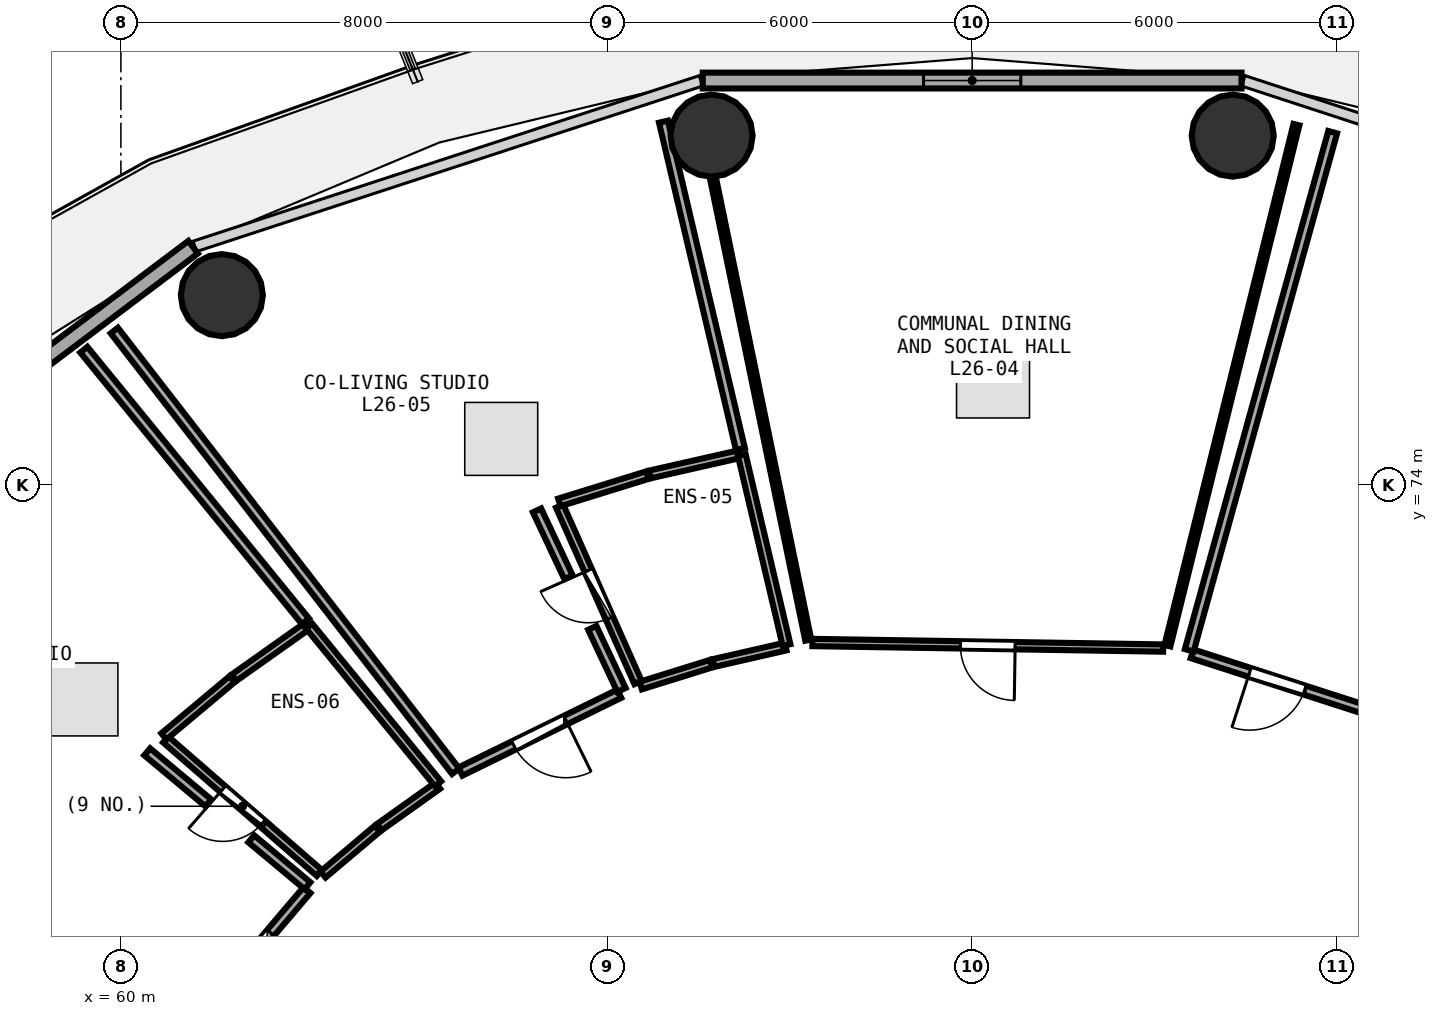
"""IFC4 building model, lengths in metres.
Left out: names, types, materials, properties, quantities, classifications, styles, units other than length and angle.
Written with IfcOpenShell. Run it as: python <this file> out.ifc"""

import sys

from ifc_helpers import new_model, si_unit, direction, frame, frame_2d, origin, origin_2d, place, context, subcontext, project, spatial, rectangle, circle, extrude, element, fill, save


model = new_model("IFC4")
c1 = context("Model", 3, precision=1e-05, world=origin(), true_north=direction((0.0, 1.0)))
c2 = subcontext(c1, "Body", "Model", "MODEL_VIEW")
j1 = project(units=[si_unit("LENGTHUNIT", "METRE"), si_unit("PLANEANGLEUNIT", "RADIAN")], contexts=[c1])
p1 = place(None, origin())
s1 = spatial("IfcSite", under=j1, at=p1, CompositionType="ELEMENT")
p2 = place(p1, origin())
s2 = spatial("IfcBuilding", under=s1, at=p2, CompositionType="ELEMENT")
p3 = place(p2, frame((0.0, 0.0, 102.6)))
s3 = spatial("IfcBuildingStorey", under=s2, at=p3, CompositionType="ELEMENT", Elevation=102.6)
for number, where, z_axis, x_axis in (
    (1, (78.286, 79.745, 0.0), (0.0, 0.0, 1.0), (1.0, 0.0, 0.0)),
    (2, (69.714, 79.745, 0.0), (0.0, 0.0, 1.0), (1.0, 0.0, 0.0)),
    (3, (61.66, 77.122, 0.0), (0.0, 0.0, 1.0), (1.0, 0.0, 0.0)),
):
    element("IfcColumn", number, at=place(p3, frame(where, z_axis=z_axis, x_axis=x_axis)), inside=s3, PredefinedType="COLUMN", context=c2, shape_type="SweptSolid", body=[
        extrude(circle(Radius=0.675, at=origin_2d()), origin(), (0.0, 0.0, 1.0), 3.75),
    ])
p4 = place(p3, frame((78.43, 80.651, 0.0), z_axis=(0.0, 0.0, 1.0), x_axis=(-1.0, 0.0, 0.0)))
e4 = element("IfcWall", 4, at=p4, inside=s3, PredefinedType="SOLIDWALL", context=c2, shape_type="SweptSolid", body=[
    extrude(rectangle(XDim=8.861, YDim=0.26, at=frame_2d((4.43, 0.0))), origin(), (0.0, 0.0, 1.0), 3.475),
])
p5 = place(p4, frame((3.63, 0.0, 0.85)))
e5 = element("IfcOpeningElement", 5, at=p5, cuts=e4, PredefinedType="OPENING", context=c2, shape_type="SweptSolid", body=[
    extrude(rectangle(XDim=1.6, YDim=1.45, at=frame_2d((0.8, 0.725))), frame((0.0, 0.14, 0.0), z_axis=(0.0, -1.0, 0.0), x_axis=(1.0, 0.0, 0.0)), (0.0, 0.0, 1.0), 0.28),
])
p6 = place(p3, frame((61.188, 77.91, 0.0), z_axis=(0.0, 0.0, 1.0), x_axis=(-0.798501507879, -0.601992808857, 0.0)))
e6 = element("IfcWall", 6, at=p6, inside=s3, PredefinedType="SOLIDWALL", context=c2, shape_type="SweptSolid", body=[
    extrude(rectangle(XDim=8.499, YDim=0.26, at=frame_2d((4.25, 0.0))), origin(), (0.0, 0.0, 1.0), 3.475),
])
p7 = place(p6, frame((3.45, 0.0, 0.85)))
e7 = element("IfcOpeningElement", 7, at=p7, cuts=e6, PredefinedType="OPENING", context=c2, shape_type="SweptSolid", body=[
    extrude(rectangle(XDim=1.6, YDim=1.45, at=frame_2d((0.8, 0.725))), frame((0.0, 0.14, 0.0), z_axis=(0.0, -1.0, 0.0), x_axis=(1.0, 0.0, 0.0)), (0.0, 0.0, 1.0), 0.28),
])
p8 = place(p3, frame((80.415, 70.32, 0.0), z_axis=(0.0, 0.0, 1.0), x_axis=(-0.951622481895, 0.307269673009, 0.0)))
e8 = element("IfcWall", 8, at=p8, inside=s3, PredefinedType="PARTITIONING", context=c2, shape_type="SweptSolid", body=[
    extrude(rectangle(XDim=2.94, YDim=0.15, at=frame_2d((1.47, 0.0))), origin(), (0.0, 0.0, 1.0), 3.235),
])
p9 = place(p8, frame((0.995, 0.0, 0.0)))
e9 = element("IfcOpeningElement", 9, at=p9, cuts=e8, PredefinedType="OPENING", context=c2, shape_type="SweptSolid", body=[
    extrude(rectangle(XDim=0.95, YDim=2.08, at=frame_2d((0.475, 1.04))), frame((0.0, 0.085, 0.0), z_axis=(0.0, -1.0, 0.0), x_axis=(1.0, 0.0, 0.0)), (0.0, 0.0, 1.0), 0.17),
])
p10 = place(p3, frame((77.142, 71.318, 0.0), z_axis=(0.0, 0.0, 1.0), x_axis=(-0.999874771211, 0.015825356091, 0.0)))
e10 = element("IfcWall", 10, at=p10, inside=s3, PredefinedType="PARTITIONING", context=c2, shape_type="SweptSolid", body=[
    extrude(rectangle(XDim=5.77, YDim=0.12, at=frame_2d((2.885, 0.0))), origin(), (0.0, 0.0, 1.0), 3.48),
])
p11 = place(p10, frame((2.435, 0.0, 0.0)))
e11 = element("IfcOpeningElement", 11, at=p11, cuts=e10, PredefinedType="OPENING", context=c2, shape_type="SweptSolid", body=[
    extrude(rectangle(XDim=0.9, YDim=2.08, at=frame_2d((0.45, 1.04))), frame((0.0, 0.07, 0.0), z_axis=(0.0, -1.0, 0.0), x_axis=(1.0, 0.0, 0.0)), (0.0, 0.0, 1.0), 0.14),
])
p12 = place(p3, frame((68.506, 70.75, 0.0), z_axis=(0.0, 0.0, 1.0), x_axis=(-0.406231177337, 0.913770337973, 0.0)))
e12 = element("IfcWall", 12, at=p12, inside=s3, PredefinedType="PLUMBINGWALL", context=c2, shape_type="SweptSolid", body=[
    extrude(rectangle(XDim=3.176, YDim=0.13, at=frame_2d((1.588, 0.0))), origin(), (0.0, 0.0, 1.0), 3.175),
])
p13 = place(p12, frame((1.158, 0.0, 0.0)))
e13 = element("IfcOpeningElement", 13, at=p13, cuts=e12, PredefinedType="OPENING", context=c2, shape_type="SweptSolid", body=[
    extrude(rectangle(XDim=0.86, YDim=2.05, at=frame_2d((0.43, 1.025))), frame((0.0, 0.075, 0.0), z_axis=(0.0, -1.0, 0.0), x_axis=(1.0, 0.0, 0.0)), (0.0, 0.0, 1.0), 0.15),
])
p14 = place(p3, frame((68.196, 70.567, 0.0), z_axis=(0.0, 0.0, 1.0), x_axis=(-0.89794088417, -0.440116085296, 0.0)))
e14 = element("IfcWall", 14, at=p14, inside=s3, PredefinedType="PARTITIONING", context=c2, shape_type="SweptSolid", body=[
    extrude(rectangle(XDim=2.909, YDim=0.15, at=frame_2d((1.455, 0.0))), origin(), (0.0, 0.0, 1.0), 3.235),
])
p15 = place(p14, frame((0.98, 0.0, 0.0)))
e15 = element("IfcOpeningElement", 15, at=p15, cuts=e14, PredefinedType="OPENING", context=c2, shape_type="SweptSolid", body=[
    extrude(rectangle(XDim=0.95, YDim=2.08, at=frame_2d((0.475, 1.04))), frame((0.0, 0.085, 0.0), z_axis=(0.0, -1.0, 0.0), x_axis=(1.0, 0.0, 0.0)), (0.0, 0.0, 1.0), 0.17),
])
p16 = place(p3, frame((63.264, 67.619, 0.0), z_axis=(0.0, 0.0, 1.0), x_axis=(-0.75497608509, 0.65575232439, 0.0)))
e16 = element("IfcWall", 16, at=p16, inside=s3, PredefinedType="PLUMBINGWALL", context=c2, shape_type="SweptSolid", body=[
    extrude(rectangle(XDim=3.346, YDim=0.13, at=frame_2d((1.673, 0.0))), origin(), (0.0, 0.0, 1.0), 3.235),
])
p17 = place(p16, frame((1.243, 0.0, 0.0)))
e17 = element("IfcOpeningElement", 17, at=p17, cuts=e16, PredefinedType="OPENING", context=c2, shape_type="SweptSolid", body=[
    extrude(rectangle(XDim=0.86, YDim=2.05, at=frame_2d((0.43, 1.025))), frame((0.0, 0.075, 0.0), z_axis=(0.0, -1.0, 0.0), x_axis=(1.0, 0.0, 0.0)), (0.0, 0.0, 1.0), 0.15),
])
p18 = place(p3, frame((63.06, 67.337, 0.0), z_axis=(0.0, 0.0, 1.0), x_axis=(-0.647519081114, -0.762049236988, 0.0)))
e18 = element("IfcWall", 18, at=p18, inside=s3, PredefinedType="PARTITIONING", context=c2, shape_type="SweptSolid", body=[
    extrude(rectangle(XDim=2.795, YDim=0.15, at=frame_2d((1.397, 0.0))), origin(), (0.0, 0.0, 1.0), 2.925),
])
p19 = place(p18, frame((0.922, 0.0, 0.0)))
e19 = element("IfcOpeningElement", 19, at=p19, cuts=e18, PredefinedType="OPENING", context=c2, shape_type="SweptSolid", body=[
    extrude(rectangle(XDim=0.95, YDim=2.08, at=frame_2d((0.475, 1.04))), frame((0.0, 0.085, 0.0), z_axis=(0.0, -1.0, 0.0), x_axis=(1.0, 0.0, 0.0)), (0.0, 0.0, 1.0), 0.17),
])
p20 = place(p3, frame((77.571, 71.281, 0.0), z_axis=(0.0, 0.0, 1.0), x_axis=(0.266746506471, 0.963766725554, 0.0)))
e20 = element("IfcWall", 20, at=p20, inside=s3, PredefinedType="PARTITIONING", context=c2, shape_type="SweptSolid", body=[
    extrude(rectangle(XDim=8.841, YDim=0.15, at=frame_2d((4.421, 0.0))), origin(), (0.0, 0.0, 1.0), 2.925),
])
p21 = place(p3, frame((71.305, 71.449, 0.0), z_axis=(0.0, 0.0, 1.0), x_axis=(-0.202123638545, 0.979360012836, 0.0)))
e21 = element("IfcWall", 21, at=p21, inside=s3, PredefinedType="PARTITIONING", context=c2, shape_type="SweptSolid", body=[
    extrude(rectangle(XDim=7.756, YDim=0.1, at=frame_2d((3.878, 0.0))), origin(), (0.0, 0.0, 1.0), 2.925),
])
p22 = place(p3, frame((79.333, 79.925, 0.0), z_axis=(0.0, 0.0, 1.0), x_axis=(-0.240342194274, -0.970688224741, 0.0)))
e22 = element("IfcWall", 22, at=p22, inside=s3, PredefinedType="PARTITIONING", context=c2, shape_type="SweptSolid", body=[
    extrude(rectangle(XDim=8.828, YDim=0.1, at=frame_2d((4.414, 0.0))), origin(), (0.0, 0.0, 1.0), 2.925),
])
p23 = place(p3, frame((70.933, 71.343, 0.0), z_axis=(0.0, 0.0, 1.0), x_axis=(-0.974915720647, -0.222574341818, 0.0)))
e23 = element("IfcWall", 23, at=p23, inside=s3, PredefinedType="PLUMBINGWALL", context=c2, shape_type="SweptSolid", body=[
    extrude(rectangle(XDim=1.218, YDim=0.13, at=frame_2d((0.609, 0.0))), origin(), (0.0, 0.0, 1.0), 2.925),
])
p24 = place(p3, frame((69.707, 71.061, 0.0), z_axis=(0.0, 0.0, 1.0), x_axis=(-0.954873275734, -0.297013513646, 0.0)))
e24 = element("IfcWall", 24, at=p24, inside=s3, PredefinedType="PLUMBINGWALL", context=c2, shape_type="SweptSolid", body=[
    extrude(rectangle(XDim=1.212, YDim=0.13, at=frame_2d((0.606, 0.0))), origin(), (0.0, 0.0, 1.0), 3.48),
])
p25 = place(p3, frame((67.21, 73.713, 0.0), z_axis=(0.0, 0.0, 1.0), x_axis=(0.955249123401, 0.295802488566, 0.0)))
e25 = element("IfcWall", 25, at=p25, inside=s3, PredefinedType="PLUMBINGWALL", context=c2, shape_type="SweptSolid", body=[
    extrude(rectangle(XDim=1.519, YDim=0.13, at=frame_2d((0.759, 0.0))), origin(), (0.0, 0.0, 1.0), 3.48),
])
p26 = place(p3, frame((68.699, 74.172, 0.0), z_axis=(0.0, 0.0, 1.0), x_axis=(0.975247540647, 0.221115884688, 0.0)))
e26 = element("IfcWall", 26, at=p26, inside=s3, PredefinedType="PLUMBINGWALL", context=c2, shape_type="SweptSolid", body=[
    extrude(rectangle(XDim=1.525, YDim=0.13, at=frame_2d((0.762, 0.0))), origin(), (0.0, 0.0, 1.0), 2.925),
])
p27 = place(p3, frame((70.211, 74.494, 0.0), z_axis=(0.0, 0.0, 1.0), x_axis=(0.229284929256, -0.973359348451, 0.0)))
e27 = element("IfcWall", 27, at=p27, inside=s3, PredefinedType="PLUMBINGWALL", context=c2, shape_type="SweptSolid", body=[
    extrude(rectangle(XDim=3.214, YDim=0.13, at=frame_2d((1.607, 0.0))), origin(), (0.0, 0.0, 1.0), 2.925),
])
p28 = place(p3, frame((65.506, 69.292, 0.0), z_axis=(0.0, 0.0, 1.0), x_axis=(-0.612364923916, 0.790575233585, 0.0)))
e28 = element("IfcWall", 28, at=p28, inside=s3, PredefinedType="PARTITIONING", context=c2, shape_type="SweptSolid", body=[
    extrude(rectangle(XDim=9.168, YDim=0.15, at=frame_2d((4.584, 0.0))), origin(), (0.0, 0.0, 1.0), 2.925),
])
p29 = place(p3, frame((68.923, 79.974, 0.0), z_axis=(0.0, 0.0, 1.0), x_axis=(0.228901508724, -0.973449587449, 0.0)))
e29 = element("IfcWall", 29, at=p29, inside=s3, PredefinedType="PARTITIONING", context=c2, shape_type="SweptSolid", body=[
    extrude(rectangle(XDim=5.529, YDim=0.15, at=frame_2d((2.765, 0.0))), origin(), (0.0, 0.0, 1.0), 2.925),
])
p30 = place(p3, frame((66.844, 73.582, 0.0), z_axis=(0.0, 0.0, 1.0), x_axis=(0.42562282943, -0.904900661436, 0.0)))
e30 = element("IfcWall", 30, at=p30, inside=s3, PredefinedType="PARTITIONING", context=c2, shape_type="SweptSolid", body=[
    extrude(rectangle(XDim=1.215, YDim=0.15, at=frame_2d((0.607, 0.0))), origin(), (0.0, 0.0, 1.0), 3.175),
])
p31 = place(p3, frame((67.753, 71.65, 0.0), z_axis=(0.0, 0.0, 1.0), x_axis=(0.425609366017, -0.904906993872, 0.0)))
e31 = element("IfcWall", 31, at=p31, inside=s3, PredefinedType="PARTITIONING", context=c2, shape_type="SweptSolid", body=[
    extrude(rectangle(XDim=1.128, YDim=0.15, at=frame_2d((0.564, 0.0))), origin(), (0.0, 0.0, 1.0), 3.48),
])
p32 = place(p3, frame((65.213, 69.057, 0.0), z_axis=(0.0, 0.0, 1.0), x_axis=(-0.814779575245, -0.579770854531, 0.0)))
e32 = element("IfcWall", 32, at=p32, inside=s3, PredefinedType="PLUMBINGWALL", context=c2, shape_type="SweptSolid", body=[
    extrude(rectangle(XDim=1.181, YDim=0.13, at=frame_2d((0.591, 0.0))), origin(), (0.0, 0.0, 1.0), 2.925),
])
p33 = place(p3, frame((64.219, 68.348, 0.0), z_axis=(0.0, 0.0, 1.0), x_axis=(-0.764137277769, -0.645053657244, 0.0)))
e33 = element("IfcWall", 33, at=p33, inside=s3, PredefinedType="PLUMBINGWALL", context=c2, shape_type="SweptSolid", body=[
    extrude(rectangle(XDim=1.171, YDim=0.13, at=frame_2d((0.585, 0.0))), origin(), (0.0, 0.0, 1.0), 3.48),
])
p34 = place(p3, frame((60.707, 69.866, 0.0), z_axis=(0.0, 0.0, 1.0), x_axis=(0.766482767596, 0.642264872913, 0.0)))
e34 = element("IfcWall", 34, at=p34, inside=s3, PredefinedType="PLUMBINGWALL", context=c2, shape_type="SweptSolid", body=[
    extrude(rectangle(XDim=1.464, YDim=0.13, at=frame_2d((0.732, 0.0))), origin(), (0.0, 0.0, 1.0), 3.48),
])
p35 = place(p3, frame((61.861, 70.831, 0.0), z_axis=(0.0, 0.0, 1.0), x_axis=(0.816339578676, 0.577572239886, 0.0)))
e35 = element("IfcWall", 35, at=p35, inside=s3, PredefinedType="PLUMBINGWALL", context=c2, shape_type="SweptSolid", body=[
    extrude(rectangle(XDim=1.477, YDim=0.13, at=frame_2d((0.738, 0.0))), origin(), (0.0, 0.0, 1.0), 3.48),
])
p36 = place(p3, frame((63.096, 71.679, 0.0), z_axis=(0.0, 0.0, 1.0), x_axis=(0.632781461548, -0.774330434583, 0.0)))
e36 = element("IfcWall", 36, at=p36, inside=s3, PredefinedType="PLUMBINGWALL", context=c2, shape_type="SweptSolid", body=[
    extrude(rectangle(XDim=3.351, YDim=0.13, at=frame_2d((1.676, 0.0))), origin(), (0.0, 0.0, 1.0), 2.925),
])
p37 = place(p3, frame((61.177, 65.181, 0.0), z_axis=(0.0, 0.0, 1.0), x_axis=(-0.878445909545, 0.477841798092, 0.0)))
e37 = element("IfcWall", 37, at=p37, inside=s3, PredefinedType="PARTITIONING", context=c2, shape_type="SweptSolid", body=[
    extrude(rectangle(XDim=9.653, YDim=0.15, at=frame_2d((4.827, 0.0))), origin(), (0.0, 0.0, 1.0), 2.925),
])
p38 = place(p3, frame((59.39, 76.225, 0.0), z_axis=(0.0, 0.0, 1.0), x_axis=(0.632139440809, -0.774854649192, 0.0)))
e38 = element("IfcWall", 38, at=p38, inside=s3, PredefinedType="PARTITIONING", context=c2, shape_type="SweptSolid", body=[
    extrude(rectangle(XDim=5.765, YDim=0.15, at=frame_2d((2.882, 0.0))), origin(), (0.0, 0.0, 1.0), 2.975),
])
p39 = place(p3, frame((60.433, 69.611, 0.0), z_axis=(0.0, 0.0, 1.0), x_axis=(0.767335111176, -0.641246307714, 0.0)))
e39 = element("IfcWall", 39, at=p39, inside=s3, PredefinedType="PARTITIONING", context=c2, shape_type="SweptSolid", body=[
    extrude(rectangle(XDim=1.311, YDim=0.15, at=frame_2d((0.655, 0.0))), origin(), (0.0, 0.0, 1.0), 3.48),
])
p40 = place(p3, frame((62.145, 68.181, 0.0), z_axis=(0.0, 0.0, 1.0), x_axis=(0.767356229846, -0.641221035616, 0.0)))
e40 = element("IfcWall", 40, at=p40, inside=s3, PredefinedType="PARTITIONING", context=c2, shape_type="SweptSolid", body=[
    extrude(rectangle(XDim=1.204, YDim=0.15, at=frame_2d((0.602, 0.0))), origin(), (0.0, 0.0, 1.0), 3.235),
])
p41 = place(p3, frame((52.382, 69.324, 0.0), z_axis=(0.0, 0.0, 1.0), x_axis=(0.889175506344, -0.457566300025, 0.0)))
e41 = element("IfcWall", 41, at=p41, inside=s3, PredefinedType="PARTITIONING", context=c2, shape_type="SweptSolid", body=[
    extrude(rectangle(XDim=9.678, YDim=0.1, at=frame_2d((4.839, 0.0))), origin(), (0.0, 0.0, 1.0), 2.925),
])
p42 = place(p5, origin())
e42 = element("IfcWindow", 42, at=p42, inside=s3, PartitioningType="SINGLE_PANEL", PredefinedType="WINDOW", context=c2, shape_type="SweptSolid", body=[
    extrude(rectangle(XDim=1.6, YDim=1.45, at=frame_2d((0.8, 0.725))), frame((0.0, 0.03, 0.0), z_axis=(0.0, -1.0, 0.0), x_axis=(1.0, 0.0, 0.0)), (0.0, 0.0, 1.0), 0.06),
])
fill(e5, e42)
p43 = place(p9, origin())
e43 = element("IfcDoor", 43, at=p43, inside=s3, OperationType="SINGLE_SWING_RIGHT", PredefinedType="DOOR", context=c2, shape_type="SweptSolid", body=[
    extrude(rectangle(XDim=0.95, YDim=2.08, at=frame_2d((0.475, 1.04))), frame((0.0, 0.025, 0.0), z_axis=(0.0, -1.0, 0.0), x_axis=(1.0, 0.0, 0.0)), (0.0, 0.0, 1.0), 0.05),
])
fill(e9, e43)
p44 = place(p11, origin())
e44 = element("IfcDoor", 44, at=p44, inside=s3, OperationType="SINGLE_SWING_LEFT", PredefinedType="DOOR", context=c2, shape_type="SweptSolid", body=[
    extrude(rectangle(XDim=0.9, YDim=2.08, at=frame_2d((0.45, 1.04))), frame((0.0, 0.025, 0.0), z_axis=(0.0, -1.0, 0.0), x_axis=(1.0, 0.0, 0.0)), (0.0, 0.0, 1.0), 0.05),
])
fill(e11, e44)
p45 = place(p13, origin())
e45 = element("IfcDoor", 45, at=p45, inside=s3, OperationType="SINGLE_SWING_RIGHT", PredefinedType="DOOR", context=c2, shape_type="SweptSolid", body=[
    extrude(rectangle(XDim=0.86, YDim=2.05, at=frame_2d((0.43, 1.025))), frame((0.0, 0.025, 0.0), z_axis=(0.0, -1.0, 0.0), x_axis=(1.0, 0.0, 0.0)), (0.0, 0.0, 1.0), 0.05),
])
fill(e13, e45)
p46 = place(p15, origin())
e46 = element("IfcDoor", 46, at=p46, inside=s3, OperationType="SINGLE_SWING_LEFT", PredefinedType="DOOR", context=c2, shape_type="SweptSolid", body=[
    extrude(rectangle(XDim=0.95, YDim=2.08, at=frame_2d((0.475, 1.04))), frame((0.0, 0.025, 0.0), z_axis=(0.0, -1.0, 0.0), x_axis=(1.0, 0.0, 0.0)), (0.0, 0.0, 1.0), 0.05),
])
fill(e15, e46)
p47 = place(p17, origin())
e47 = element("IfcDoor", 47, at=p47, inside=s3, OperationType="SINGLE_SWING_RIGHT", PredefinedType="DOOR", context=c2, shape_type="SweptSolid", body=[
    extrude(rectangle(XDim=0.86, YDim=2.05, at=frame_2d((0.43, 1.025))), frame((0.0, 0.025, 0.0), z_axis=(0.0, -1.0, 0.0), x_axis=(1.0, 0.0, 0.0)), (0.0, 0.0, 1.0), 0.05),
])
fill(e17, e47)
p48 = place(p19, origin())
e48 = element("IfcDoor", 48, at=p48, inside=s3, OperationType="SINGLE_SWING_LEFT", PredefinedType="DOOR", context=c2, shape_type="SweptSolid", body=[
    extrude(rectangle(XDim=0.95, YDim=2.08, at=frame_2d((0.475, 1.04))), frame((0.0, 0.025, 0.0), z_axis=(0.0, -1.0, 0.0), x_axis=(1.0, 0.0, 0.0)), (0.0, 0.0, 1.0), 0.05),
])
fill(e19, e48)
save(model, sys.argv[1])
